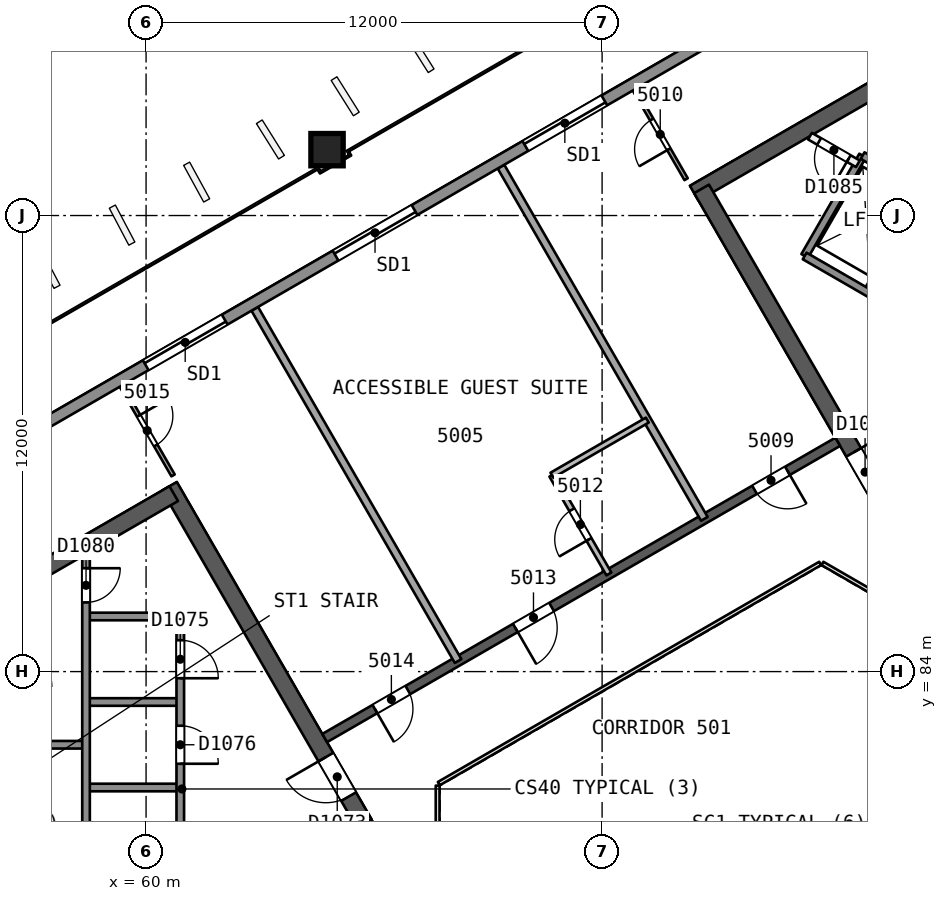
"""IFC4 building model, lengths in metres.
Left out: names, types, materials, properties, quantities, classifications, styles, units other than length and angle.
Written with IfcOpenShell. Run it as: python <this file> out.ifc"""

import sys

from ifc_helpers import new_model, si_unit, direction, frame, frame_2d, origin, origin_2d, place, context, subcontext, project, spatial, rectangle, extrude, element, fill, save


model = new_model("IFC4")
c1 = context("Model", 3, precision=1e-05, world=origin(), true_north=direction((0.0, 1.0)))
c2 = subcontext(c1, "Body", "Model", "MODEL_VIEW")
j1 = project(units=[si_unit("LENGTHUNIT", "METRE"), si_unit("PLANEANGLEUNIT", "RADIAN")], contexts=[c1])
p1 = place(None, origin())
s1 = spatial("IfcSite", under=j1, at=p1, CompositionType="ELEMENT")
p2 = place(p1, origin())
s2 = spatial("IfcBuilding", under=s1, at=p2, CompositionType="ELEMENT")
p3 = place(p2, frame((0.0, 0.0, 205.8)))
s3 = spatial("IfcBuildingStorey", under=s2, at=p3, CompositionType="ELEMENT", Elevation=205.8)
p4 = place(p3, frame((65.74, 80.0, 0.0), z_axis=(0.0, 0.0, 1.0), x_axis=(-0.499991857942, 0.866030104553, 0.0)))
e1 = element("IfcWall", 1, at=p4, inside=s3, PredefinedType="SHEAR", context=c2, shape_type="SweptSolid", body=[
    extrude(rectangle(XDim=10.25, YDim=0.45, at=frame_2d((5.125, 0.0))), origin(), (0.0, 0.0, 1.0), 3.7),
])
p5 = place(p4, frame((0.82, 0.0, 0.0)))
e2 = element("IfcOpeningElement", 2, at=p5, cuts=e1, PredefinedType="OPENING", context=c2, shape_type="SweptSolid", body=[
    extrude(rectangle(XDim=1.2, YDim=2.1, at=frame_2d((0.6, 1.05))), frame((0.0, 0.235, 0.0), z_axis=(0.0, -1.0, 0.0), x_axis=(1.0, 0.0, 0.0)), (0.0, 0.0, 1.0), 0.471),
])
p6 = place(p3, frame((60.728, 88.682, 0.0), z_axis=(0.0, 0.0, 1.0), x_axis=(-0.866021613849, -0.500006564303, 0.0)))
e3 = element("IfcWall", 3, at=p6, inside=s3, PredefinedType="SHEAR", context=c2, shape_type="SweptSolid", body=[
    extrude(rectangle(XDim=14.108, YDim=0.45, at=frame_2d((7.054, 0.0))), origin(), (0.0, 0.0, 1.0), 3.7),
])
p7 = place(p3, frame((60.728, 71.318, 0.0), z_axis=(0.0, 0.0, 1.0), x_axis=(0.500012416173, 0.866018235185, 0.0)))
e4 = element("IfcWall", 4, at=p7, inside=s3, PredefinedType="SHEAR", context=c2, shape_type="SweptSolid", body=[
    extrude(rectangle(XDim=10.155, YDim=0.45, at=frame_2d((5.078, 0.0))), origin(), (0.0, 0.0, 1.0), 3.7),
])
p8 = place(p7, frame((8.005, 0.0, 0.0)))
e5 = element("IfcOpeningElement", 5, at=p8, cuts=e4, PredefinedType="OPENING", context=c2, shape_type="SweptSolid", body=[
    extrude(rectangle(XDim=1.2, YDim=2.1, at=frame_2d((0.6, 1.05))), frame((0.0, 0.235, 0.0), z_axis=(0.0, -1.0, 0.0), x_axis=(1.0, 0.0, 0.0)), (0.0, 0.0, 1.0), 0.471),
])
p9 = place(p3, frame((86.723, 103.69, 0.0), z_axis=(0.0, 0.0, 1.0), x_axis=(-0.866022713978, -0.500004658852, 0.0)))
e6 = element("IfcWall", 6, at=p9, inside=s3, PredefinedType="SHEAR", context=c2, shape_type="SweptSolid", body=[
    extrude(rectangle(XDim=14.203, YDim=0.45, at=frame_2d((7.102, 0.0))), origin(), (0.0, 0.0, 1.0), 3.7),
])
p10 = place(p3, frame((74.617, 96.701, 0.0), z_axis=(0.0, 0.0, 1.0), x_axis=(0.499994385119, -0.866028645513, 0.0)))
e7 = element("IfcWall", 7, at=p10, inside=s3, PredefinedType="SHEAR", context=c2, shape_type="SweptSolid", body=[
    extrude(rectangle(XDim=10.155, YDim=0.45, at=frame_2d((5.077, 0.0))), origin(), (0.0, 0.0, 1.0), 3.7),
])
p11 = place(p10, frame((8.005, 0.0, 0.0)))
e8 = element("IfcOpeningElement", 8, at=p11, cuts=e7, PredefinedType="OPENING", context=c2, shape_type="SweptSolid", body=[
    extrude(rectangle(XDim=1.2, YDim=2.1, at=frame_2d((0.6, 1.05))), frame((0.0, 0.235, 0.0), z_axis=(0.0, -1.0, 0.0), x_axis=(1.0, 0.0, 0.0)), (0.0, 0.0, 1.0), 0.471),
])
p12 = place(p3, frame((78.2, 90.046, 0.0), z_axis=(0.0, 0.0, 1.0), x_axis=(-0.866026492143, -0.499998114903, 0.0)))
e9 = element("IfcWall", 9, at=p12, inside=s3, PredefinedType="SHEAR", context=c2, shape_type="SweptSolid", body=[
    extrude(rectangle(XDim=15.588, YDim=0.25, at=frame_2d((7.794, 0.0))), origin(), (0.0, 0.0, 1.0), 3.3),
])
p13 = place(p12, frame((1.527, 0.0, 0.0)))
e10 = element("IfcOpeningElement", 10, at=p13, cuts=e9, PredefinedType="OPENING", context=c2, shape_type="SweptSolid", body=[
    extrude(rectangle(XDim=1.0, YDim=2.1, at=frame_2d((0.5, 1.05))), frame((0.0, 0.135, 0.0), z_axis=(0.0, -1.0, 0.0), x_axis=(1.0, 0.0, 0.0)), (0.0, 0.0, 1.0), 0.271),
])
p14 = place(p12, frame((8.694, 0.0, 0.0)))
e11 = element("IfcOpeningElement", 11, at=p14, cuts=e9, PredefinedType="OPENING", context=c2, shape_type="SweptSolid", body=[
    extrude(rectangle(XDim=1.1, YDim=2.1, at=frame_2d((0.55, 1.05))), frame((0.0, 0.135, 0.0), z_axis=(0.0, -1.0, 0.0), x_axis=(1.0, 0.0, 0.0)), (0.0, 0.0, 1.0), 0.271),
])
p15 = place(p12, frame((13.062, 0.0, 0.0)))
e12 = element("IfcOpeningElement", 12, at=p15, cuts=e9, PredefinedType="OPENING", context=c2, shape_type="SweptSolid", body=[
    extrude(rectangle(XDim=1.0, YDim=2.1, at=frame_2d((0.5, 1.05))), frame((0.0, 0.135, 0.0), z_axis=(0.0, -1.0, 0.0), x_axis=(1.0, 0.0, 0.0)), (0.0, 0.0, 1.0), 0.271),
])
p16 = place(p3, frame((64.75, 97.754, 0.0), z_axis=(0.010093620709, -0.017482414954, 0.999796221231), x_axis=(-0.499902890187, 0.86584616669, 0.020187025825)))
e13 = element("IfcColumn", 13, at=p16, inside=s3, PredefinedType="COLUMN", context=c2, shape_type="SweptSolid", body=[
    extrude(rectangle(XDim=0.85, YDim=0.85, at=origin_2d()), origin(), (0.0, 0.0, 1.0), 3.701),
])
p17 = place(p3, frame((74.21, 96.956, 0.0), z_axis=(0.0, 0.0, 1.0), x_axis=(-0.499957886064, 0.866049716911, 0.0)))
e14 = element("IfcWall", 14, at=p17, inside=s3, PredefinedType="PARTITIONING", context=c2, shape_type="SweptSolid", body=[
    extrude(rectangle(XDim=2.723, YDim=0.1, at=frame_2d((1.361, 0.0))), origin(), (0.0, 0.0, 1.0), 3.3),
])
p18 = place(p17, frame((0.911, 0.0, 0.0)))
e15 = element("IfcOpeningElement", 15, at=p18, cuts=e14, PredefinedType="OPENING", context=c2, shape_type="SweptSolid", body=[
    extrude(rectangle(XDim=0.9, YDim=2.1, at=frame_2d((0.45, 1.05))), frame((0.0, 0.061, 0.0), z_axis=(0.0, -1.0, 0.0), x_axis=(1.0, 0.0, 0.0)), (0.0, 0.0, 1.0), 0.121),
])
p19 = place(p3, frame((69.339, 97.287, 0.0), z_axis=(0.0, 0.0, 1.0), x_axis=(0.499993653641, -0.866029067825, 0.0)))
e16 = element("IfcWall", 16, at=p19, inside=s3, PredefinedType="PARTITIONING", context=c2, shape_type="SweptSolid", body=[
    extrude(rectangle(XDim=10.702, YDim=0.2, at=frame_2d((5.351, 0.0))), origin(), (0.0, 0.0, 1.0), 3.3),
])
p20 = place(p3, frame((72.178, 86.569, 0.0), z_axis=(0.0, 0.0, 1.0), x_axis=(-0.499990139034, 0.866031096941, 0.0)))
e17 = element("IfcWall", 17, at=p20, inside=s3, PredefinedType="PARTITIONING", context=c2, shape_type="SweptSolid", body=[
    extrude(rectangle(XDim=3.0, YDim=0.15, at=frame_2d((1.5, 0.0))), origin(), (0.0, 0.0, 1.0), 3.3),
])
p21 = place(p20, frame((1.05, 0.0, 0.0)))
e18 = element("IfcOpeningElement", 18, at=p21, cuts=e17, PredefinedType="OPENING", context=c2, shape_type="SweptSolid", body=[
    extrude(rectangle(XDim=0.9, YDim=2.1, at=frame_2d((0.45, 1.05))), frame((0.0, 0.085, 0.0), z_axis=(0.0, -1.0, 0.0), x_axis=(1.0, 0.0, 0.0)), (0.0, 0.0, 1.0), 0.171),
])
p22 = place(p3, frame((70.678, 89.167, 0.0), z_axis=(0.0, 0.0, 1.0), x_axis=(0.866032775405, 0.499987231761, 0.0)))
e19 = element("IfcWall", 19, at=p22, inside=s3, PredefinedType="PARTITIONING", context=c2, shape_type="SweptSolid", body=[
    extrude(rectangle(XDim=2.9, YDim=0.15, at=frame_2d((1.45, 0.0))), origin(), (0.0, 0.0, 1.0), 3.3),
])
p23 = place(p3, frame((62.859, 93.546, 0.0), z_axis=(0.0, 0.0, 1.0), x_axis=(0.499993653641, -0.866029067825, 0.0)))
e20 = element("IfcWall", 20, at=p23, inside=s3, PredefinedType="PARTITIONING", context=c2, shape_type="SweptSolid", body=[
    extrude(rectangle(XDim=10.702, YDim=0.2, at=frame_2d((5.351, 0.0))), origin(), (0.0, 0.0, 1.0), 3.3),
])
p24 = place(p3, frame((59.349, 91.52, 0.0), z_axis=(0.0, 0.0, 1.0), x_axis=(0.499957886064, -0.866049716911, 0.0)))
e21 = element("IfcWall", 21, at=p24, inside=s3, PredefinedType="PARTITIONING", context=c2, shape_type="SweptSolid", body=[
    extrude(rectangle(XDim=2.723, YDim=0.1, at=frame_2d((1.361, 0.0))), origin(), (0.0, 0.0, 1.0), 3.3),
])
p25 = place(p24, frame((0.911, 0.0, 0.0)))
e22 = element("IfcOpeningElement", 22, at=p25, cuts=e21, PredefinedType="OPENING", context=c2, shape_type="SweptSolid", body=[
    extrude(rectangle(XDim=0.9, YDim=2.1, at=frame_2d((0.45, 1.05))), frame((0.0, 0.061, 0.0), z_axis=(0.0, -1.0, 0.0), x_axis=(1.0, 0.0, 0.0)), (0.0, 0.0, 1.0), 0.121),
])
p26 = place(p3, frame((43.672, 82.641, 0.0), z_axis=(0.0, 0.0, 1.0), x_axis=(0.866024917385, 0.500000842468, 0.0)))
e23 = element("IfcWall", 23, at=p26, inside=s3, PredefinedType="SOLIDWALL", context=c2, shape_type="SweptSolid", body=[
    extrude(rectangle(XDim=51.621, YDim=0.3, at=frame_2d((25.811, 0.0))), origin(), (0.0, 0.0, 1.0), 3.3),
])
p27 = place(p26, frame((24.611, 0.0, 0.0)))
e24 = element("IfcOpeningElement", 24, at=p27, cuts=e23, PredefinedType="OPENING", context=c2, shape_type="SweptSolid", body=[
    extrude(rectangle(XDim=2.4, YDim=2.4, at=frame_2d((1.2, 1.2))), frame((0.0, 0.161, 0.0), z_axis=(0.0, -1.0, 0.0), x_axis=(1.0, 0.0, 0.0)), (0.0, 0.0, 1.0), 0.321),
])
p28 = place(p26, frame((30.378, 0.0, 0.0)))
e25 = element("IfcOpeningElement", 25, at=p28, cuts=e23, PredefinedType="OPENING", context=c2, shape_type="SweptSolid", body=[
    extrude(rectangle(XDim=2.4, YDim=2.4, at=frame_2d((1.2, 1.2))), frame((0.0, 0.161, 0.0), z_axis=(0.0, -1.0, 0.0), x_axis=(1.0, 0.0, 0.0)), (0.0, 0.0, 1.0), 0.321),
])
p29 = place(p26, frame((40.147, 0.0, 0.0)))
e26 = element("IfcOpeningElement", 26, at=p29, cuts=e23, PredefinedType="OPENING", context=c2, shape_type="SweptSolid", body=[
    extrude(rectangle(XDim=2.4, YDim=2.4, at=frame_2d((1.2, 1.2))), frame((0.0, 0.161, 0.0), z_axis=(0.0, -1.0, 0.0), x_axis=(1.0, 0.0, 0.0)), (0.0, 0.0, 1.0), 0.321),
])
p30 = place(p26, frame((18.843, 0.0, 0.0)))
e27 = element("IfcOpeningElement", 27, at=p30, cuts=e23, PredefinedType="OPENING", context=c2, shape_type="SweptSolid", body=[
    extrude(rectangle(XDim=2.4, YDim=2.4, at=frame_2d((1.2, 1.2))), frame((0.0, 0.161, 0.0), z_axis=(0.0, -1.0, 0.0), x_axis=(1.0, 0.0, 0.0)), (0.0, 0.0, 1.0), 0.321),
])
p31 = place(p26, frame((9.107, 0.0, 0.0)))
e28 = element("IfcOpeningElement", 28, at=p31, cuts=e23, PredefinedType="OPENING", context=c2, shape_type="SweptSolid", body=[
    extrude(rectangle(XDim=2.4, YDim=2.4, at=frame_2d((1.2, 1.2))), frame((0.0, 0.161, 0.0), z_axis=(0.0, -1.0, 0.0), x_axis=(1.0, 0.0, 0.0)), (0.0, 0.0, 1.0), 0.321),
])
for number, where, z_axis, x_axis in (
    (29, (60.9, 85.45, 0.0), (0.0, 0.0, 1.0), (-1.0, 0.0, 0.0)),
    (30, (60.9, 83.2, 0.0), (0.0, 0.0, 1.0), (-1.0, 0.0, 0.0)),
):
    element("IfcWall", number, at=place(p3, frame(where, z_axis=z_axis, x_axis=x_axis)), inside=s3, PredefinedType="SOLIDWALL", context=c2, shape_type="SweptSolid", body=[
        extrude(rectangle(XDim=2.48, YDim=0.2, at=frame_2d((1.24, 0.0))), origin(), (0.0, 0.0, 1.0), 3.3),
    ])
p32 = place(p3, frame((58.42, 82.075, 0.0), z_axis=(0.0, 0.0, 1.0), x_axis=(-1.0, 0.0, 0.0)))
e31 = element("IfcWall", 31, at=p32, inside=s3, PredefinedType="SOLIDWALL", context=c2, shape_type="SweptSolid", body=[
    extrude(rectangle(XDim=7.7, YDim=0.2, at=frame_2d((3.85, 0.0))), origin(), (0.0, 0.0, 1.0), 3.3),
])
p33 = place(p3, frame((60.9, 80.95, 0.0), z_axis=(0.0, 0.0, 1.0), x_axis=(-1.0, 0.0, 0.0)))
e32 = element("IfcWall", 32, at=p33, inside=s3, PredefinedType="SOLIDWALL", context=c2, shape_type="SweptSolid", body=[
    extrude(rectangle(XDim=2.48, YDim=0.2, at=frame_2d((1.24, 0.0))), origin(), (0.0, 0.0, 1.0), 3.3),
])
p34 = place(p3, frame((60.9, 85.45, 0.0), z_axis=(0.0, 0.0, 1.0), x_axis=(0.0, -1.0, 0.0)))
e33 = element("IfcWall", 33, at=p34, inside=s3, PredefinedType="SOLIDWALL", context=c2, shape_type="SweptSolid", body=[
    extrude(rectangle(XDim=10.9, YDim=0.2, at=frame_2d((5.45, 0.0))), origin(), (0.0, 0.0, 1.0), 3.3),
])
p35 = place(p34, frame((0.625, 0.0, 0.0)))
e34 = element("IfcOpeningElement", 34, at=p35, cuts=e33, PredefinedType="OPENING", context=c2, shape_type="SweptSolid", body=[
    extrude(rectangle(XDim=1.0, YDim=2.1, at=frame_2d((0.5, 1.05))), frame((0.0, 0.11, 0.0), z_axis=(0.0, -1.0, 0.0), x_axis=(1.0, 0.0, 0.0)), (0.0, 0.0, 1.0), 0.221),
])
p36 = place(p34, frame((2.875, 0.0, 0.0)))
e35 = element("IfcOpeningElement", 35, at=p36, cuts=e33, PredefinedType="OPENING", context=c2, shape_type="SweptSolid", body=[
    extrude(rectangle(XDim=1.0, YDim=2.1, at=frame_2d((0.5, 1.05))), frame((0.0, 0.11, 0.0), z_axis=(0.0, -1.0, 0.0), x_axis=(1.0, 0.0, 0.0)), (0.0, 0.0, 1.0), 0.221),
])
p37 = place(p34, frame((6.25, 0.0, 0.0)))
e36 = element("IfcOpeningElement", 36, at=p37, cuts=e33, PredefinedType="OPENING", context=c2, shape_type="SweptSolid", body=[
    extrude(rectangle(XDim=1.0, YDim=2.1, at=frame_2d((0.5, 1.05))), frame((0.0, 0.11, 0.0), z_axis=(0.0, -1.0, 0.0), x_axis=(1.0, 0.0, 0.0)), (0.0, 0.0, 1.0), 0.221),
])
p38 = place(p3, frame((58.42, 87.09, 0.0), z_axis=(0.0, 0.0, 1.0), x_axis=(0.0, -1.0, 0.0)))
e37 = element("IfcWall", 37, at=p38, inside=s3, PredefinedType="SOLIDWALL", context=c2, shape_type="SweptSolid", body=[
    extrude(rectangle(XDim=10.64, YDim=0.2, at=frame_2d((5.32, 0.0))), origin(), (0.0, 0.0, 1.0), 3.3),
])
p39 = place(p38, frame((0.37, 0.0, 0.0)))
e38 = element("IfcOpeningElement", 38, at=p39, cuts=e37, PredefinedType="OPENING", context=c2, shape_type="SweptSolid", body=[
    extrude(rectangle(XDim=0.9, YDim=2.1, at=frame_2d((0.45, 1.05))), frame((0.0, 0.11, 0.0), z_axis=(0.0, -1.0, 0.0), x_axis=(1.0, 0.0, 0.0)), (0.0, 0.0, 1.0), 0.221),
])
for number, where, z_axis, x_axis in (
    (39, (78.976, 93.986, 0.0), (0.0, 0.0, 1.0), (0.5, 0.866, 0.0)),
    (40, (77.33, 94.936, 0.0), (0.0, 0.0, 1.0), (0.5, 0.866, 0.0)),
):
    element("IfcWall", number, at=place(p3, frame(where, z_axis=z_axis, x_axis=x_axis)), inside=s3, PredefinedType="SOLIDWALL", context=c2, shape_type="SweptSolid", body=[
        extrude(rectangle(XDim=3.05, YDim=0.2, at=frame_2d((1.525, 0.0))), origin(), (0.0, 0.0, 1.0), 3.3),
    ])
p40 = place(p3, frame((86.77, 89.486, 0.0), z_axis=(0.0, 0.0, 1.0), x_axis=(-0.86601811187, 0.500012629753, 0.0)))
e41 = element("IfcWall", 41, at=p40, inside=s3, PredefinedType="SOLIDWALL", context=c2, shape_type="SweptSolid", body=[
    extrude(rectangle(XDim=10.9, YDim=0.2, at=frame_2d((5.45, 0.0))), origin(), (0.0, 0.0, 1.0), 3.3),
])
p41 = place(p3, frame((78.73, 97.361, 0.0), z_axis=(0.0, 0.0, 1.0), x_axis=(-0.866045896294, 0.499964504253, 0.0)))
e42 = element("IfcWall", 42, at=p41, inside=s3, PredefinedType="PARTITIONING", context=c2, shape_type="SweptSolid", body=[
    extrude(rectangle(XDim=1.455, YDim=0.2, at=frame_2d((0.728, 0.0))), origin(), (0.0, 0.0, 1.0), 3.3),
])
p42 = place(p41, frame((0.278, 0.0, 0.0)))
e43 = element("IfcOpeningElement", 43, at=p42, cuts=e42, PredefinedType="OPENING", context=c2, shape_type="SweptSolid", body=[
    extrude(rectangle(XDim=0.9, YDim=2.1, at=frame_2d((0.45, 1.05))), frame((0.0, 0.11, 0.0), z_axis=(0.0, -1.0, 0.0), x_axis=(1.0, 0.0, 0.0)), (0.0, 0.0, 1.0), 0.221),
])
p43 = place(p3, frame((80.5, 96.627, 0.0), z_axis=(0.0, 0.0, 1.0), x_axis=(-0.86601224135, 0.500022797313, 0.0)))
e44 = element("IfcWall", 44, at=p43, inside=s3, PredefinedType="SOLIDWALL", context=c2, shape_type="SweptSolid", body=[
    extrude(rectangle(XDim=1.9, YDim=0.2, at=frame_2d((0.95, 0.0))), origin(), (0.0, 0.0, 1.0), 3.3),
])
p44 = place(p43, frame((0.4, 0.0, 0.0)))
e45 = element("IfcOpeningElement", 45, at=p44, cuts=e44, PredefinedType="OPENING", context=c2, shape_type="SweptSolid", body=[
    extrude(rectangle(XDim=1.1, YDim=2.1, at=frame_2d((0.55, 1.05))), frame((0.0, 0.11, 0.0), z_axis=(0.0, -1.0, 0.0), x_axis=(1.0, 0.0, 0.0)), (0.0, 0.0, 1.0), 0.221),
])
p45 = place(p3, frame((79.53, 85.846, 0.0), z_axis=(0.0, 0.0, 1.0), x_axis=(-0.866041268327, 0.499972520799, 0.0)))
e46 = element("IfcWall", 46, at=p45, inside=s3, PredefinedType="PARTITIONING", context=c2, shape_type="SweptSolid", body=[
    extrude(rectangle(XDim=2.0, YDim=0.1, at=frame_2d((1.0, 0.0))), origin(), (0.0, 0.0, 1.0), 3.3),
])
p46 = place(p3, frame((77.738, 86.846, 0.0), z_axis=(0.0, 0.0, 1.0), x_axis=(-0.866026658274, -0.499997827154, 0.0)))
e47 = element("IfcWall", 47, at=p46, inside=s3, PredefinedType="PARTITIONING", context=c2, shape_type="SweptSolid", body=[
    extrude(rectangle(XDim=11.588, YDim=0.1, at=frame_2d((5.794, 0.0))), origin(), (0.0, 0.0, 1.0), 3.3),
])
p47 = place(p3, frame((67.672, 81.0, 0.0), z_axis=(0.0, 0.0, 1.0), x_axis=(0.0, -1.0, 0.0)))
e48 = element("IfcWall", 48, at=p47, inside=s3, PredefinedType="PARTITIONING", context=c2, shape_type="SweptSolid", body=[
    extrude(rectangle(XDim=2.0, YDim=0.1, at=frame_2d((1.0, 0.0))), origin(), (0.0, 0.0, 1.0), 3.3),
])
p48 = place(p13, origin())
e49 = element("IfcDoor", 49, at=p48, inside=s3, OperationType="SINGLE_SWING_LEFT", PredefinedType="NOTDEFINED", context=c2, shape_type="SweptSolid", body=[
    extrude(rectangle(XDim=1.0, YDim=2.1, at=frame_2d((0.5, 1.05))), frame((0.0, 0.025, 0.0), z_axis=(0.0, -1.0, 0.0), x_axis=(1.0, 0.0, 0.0)), (0.0, 0.0, 1.0), 0.05),
])
fill(e10, e49)
p49 = place(p18, origin())
e50 = element("IfcDoor", 50, at=p49, inside=s3, OperationType="SINGLE_SWING_LEFT", PredefinedType="NOTDEFINED", context=c2, shape_type="SweptSolid", body=[
    extrude(rectangle(XDim=0.9, YDim=2.1, at=frame_2d((0.45, 1.05))), frame((0.0, 0.025, 0.0), z_axis=(0.0, -1.0, 0.0), x_axis=(1.0, 0.0, 0.0)), (0.0, 0.0, 1.0), 0.05),
])
fill(e15, e50)
p50 = place(p21, origin())
e51 = element("IfcDoor", 51, at=p50, inside=s3, OperationType="SINGLE_SWING_LEFT", PredefinedType="NOTDEFINED", context=c2, shape_type="SweptSolid", body=[
    extrude(rectangle(XDim=0.9, YDim=2.1, at=frame_2d((0.45, 1.05))), frame((0.0, 0.025, 0.0), z_axis=(0.0, -1.0, 0.0), x_axis=(1.0, 0.0, 0.0)), (0.0, 0.0, 1.0), 0.05),
])
fill(e18, e51)
p51 = place(p14, origin())
e52 = element("IfcDoor", 52, at=p51, inside=s3, OperationType="SINGLE_SWING_RIGHT", PredefinedType="NOTDEFINED", context=c2, shape_type="SweptSolid", body=[
    extrude(rectangle(XDim=1.1, YDim=2.1, at=frame_2d((0.55, 1.05))), frame((0.0, 0.025, 0.0), z_axis=(0.0, -1.0, 0.0), x_axis=(1.0, 0.0, 0.0)), (0.0, 0.0, 1.0), 0.05),
])
fill(e11, e52)
p52 = place(p15, origin())
e53 = element("IfcDoor", 53, at=p52, inside=s3, OperationType="SINGLE_SWING_RIGHT", PredefinedType="NOTDEFINED", context=c2, shape_type="SweptSolid", body=[
    extrude(rectangle(XDim=1.0, YDim=2.1, at=frame_2d((0.5, 1.05))), frame((0.0, 0.025, 0.0), z_axis=(0.0, -1.0, 0.0), x_axis=(1.0, 0.0, 0.0)), (0.0, 0.0, 1.0), 0.05),
])
fill(e12, e53)
p53 = place(p25, origin())
e54 = element("IfcDoor", 54, at=p53, inside=s3, OperationType="SINGLE_SWING_LEFT", PredefinedType="NOTDEFINED", context=c2, shape_type="SweptSolid", body=[
    extrude(rectangle(XDim=0.9, YDim=2.1, at=frame_2d((0.45, 1.05))), frame((0.0, 0.025, 0.0), z_axis=(0.0, -1.0, 0.0), x_axis=(1.0, 0.0, 0.0)), (0.0, 0.0, 1.0), 0.05),
])
fill(e22, e54)
p54 = place(p27, origin())
e55 = element("IfcDoor", 55, at=p54, inside=s3, OperationType="SLIDING_TO_LEFT", PredefinedType="NOTDEFINED", context=c2, shape_type="SweptSolid", body=[
    extrude(rectangle(XDim=2.4, YDim=2.4, at=frame_2d((1.2, 1.2))), frame((0.0, 0.025, 0.0), z_axis=(0.0, -1.0, 0.0), x_axis=(1.0, 0.0, 0.0)), (0.0, 0.0, 1.0), 0.05),
])
fill(e24, e55)
p55 = place(p28, origin())
e56 = element("IfcDoor", 56, at=p55, inside=s3, OperationType="SLIDING_TO_RIGHT", PredefinedType="NOTDEFINED", context=c2, shape_type="SweptSolid", body=[
    extrude(rectangle(XDim=2.4, YDim=2.4, at=frame_2d((1.2, 1.2))), frame((0.0, 0.025, 0.0), z_axis=(0.0, -1.0, 0.0), x_axis=(1.0, 0.0, 0.0)), (0.0, 0.0, 1.0), 0.05),
])
fill(e25, e56)
p56 = place(p30, origin())
e57 = element("IfcDoor", 57, at=p56, inside=s3, OperationType="SLIDING_TO_RIGHT", PredefinedType="NOTDEFINED", context=c2, shape_type="SweptSolid", body=[
    extrude(rectangle(XDim=2.4, YDim=2.4, at=frame_2d((1.2, 1.2))), frame((0.0, 0.025, 0.0), z_axis=(0.0, -1.0, 0.0), x_axis=(1.0, 0.0, 0.0)), (0.0, 0.0, 1.0), 0.05),
])
fill(e27, e57)
p57 = place(p5, origin())
e58 = element("IfcDoor", 58, at=p57, inside=s3, OperationType="SINGLE_SWING_RIGHT", PredefinedType="NOTDEFINED", context=c2, shape_type="SweptSolid", body=[
    extrude(rectangle(XDim=1.2, YDim=2.1, at=frame_2d((0.6, 1.05))), frame((0.0, 0.025, 0.0), z_axis=(0.0, -1.0, 0.0), x_axis=(1.0, 0.0, 0.0)), (0.0, 0.0, 1.0), 0.05),
])
fill(e2, e58)
p58 = place(p35, origin())
e59 = element("IfcDoor", 59, at=p58, inside=s3, OperationType="SINGLE_SWING_RIGHT", PredefinedType="NOTDEFINED", context=c2, shape_type="SweptSolid", body=[
    extrude(rectangle(XDim=1.0, YDim=2.1, at=frame_2d((0.5, 1.05))), frame((0.0, 0.025, 0.0), z_axis=(0.0, -1.0, 0.0), x_axis=(1.0, 0.0, 0.0)), (0.0, 0.0, 1.0), 0.05),
])
fill(e34, e59)
p59 = place(p36, origin())
e60 = element("IfcDoor", 60, at=p59, inside=s3, OperationType="SINGLE_SWING_RIGHT", PredefinedType="NOTDEFINED", context=c2, shape_type="SweptSolid", body=[
    extrude(rectangle(XDim=1.0, YDim=2.1, at=frame_2d((0.5, 1.05))), frame((0.0, 0.025, 0.0), z_axis=(0.0, -1.0, 0.0), x_axis=(1.0, 0.0, 0.0)), (0.0, 0.0, 1.0), 0.05),
])
fill(e35, e60)
p60 = place(p39, origin())
e61 = element("IfcDoor", 61, at=p60, inside=s3, OperationType="SINGLE_SWING_LEFT", PredefinedType="NOTDEFINED", context=c2, shape_type="SweptSolid", body=[
    extrude(rectangle(XDim=0.9, YDim=2.1, at=frame_2d((0.45, 1.05))), frame((0.0, 0.025, 0.0), z_axis=(0.0, -1.0, 0.0), x_axis=(1.0, 0.0, 0.0)), (0.0, 0.0, 1.0), 0.05),
])
fill(e38, e61)
p61 = place(p11, origin())
e62 = element("IfcDoor", 62, at=p61, inside=s3, OperationType="SINGLE_SWING_LEFT", PredefinedType="NOTDEFINED", context=c2, shape_type="SweptSolid", body=[
    extrude(rectangle(XDim=1.2, YDim=2.1, at=frame_2d((0.6, 1.05))), frame((0.0, 0.025, 0.0), z_axis=(0.0, -1.0, 0.0), x_axis=(1.0, 0.0, 0.0)), (0.0, 0.0, 1.0), 0.05),
])
fill(e8, e62)
p62 = place(p42, origin())
e63 = element("IfcDoor", 63, at=p62, inside=s3, OperationType="SINGLE_SWING_LEFT", PredefinedType="NOTDEFINED", context=c2, shape_type="SweptSolid", body=[
    extrude(rectangle(XDim=0.9, YDim=2.1, at=frame_2d((0.45, 1.05))), frame((0.0, 0.025, 0.0), z_axis=(0.0, -1.0, 0.0), x_axis=(1.0, 0.0, 0.0)), (0.0, 0.0, 1.0), 0.05),
])
fill(e43, e63)
save(model, sys.argv[1])
